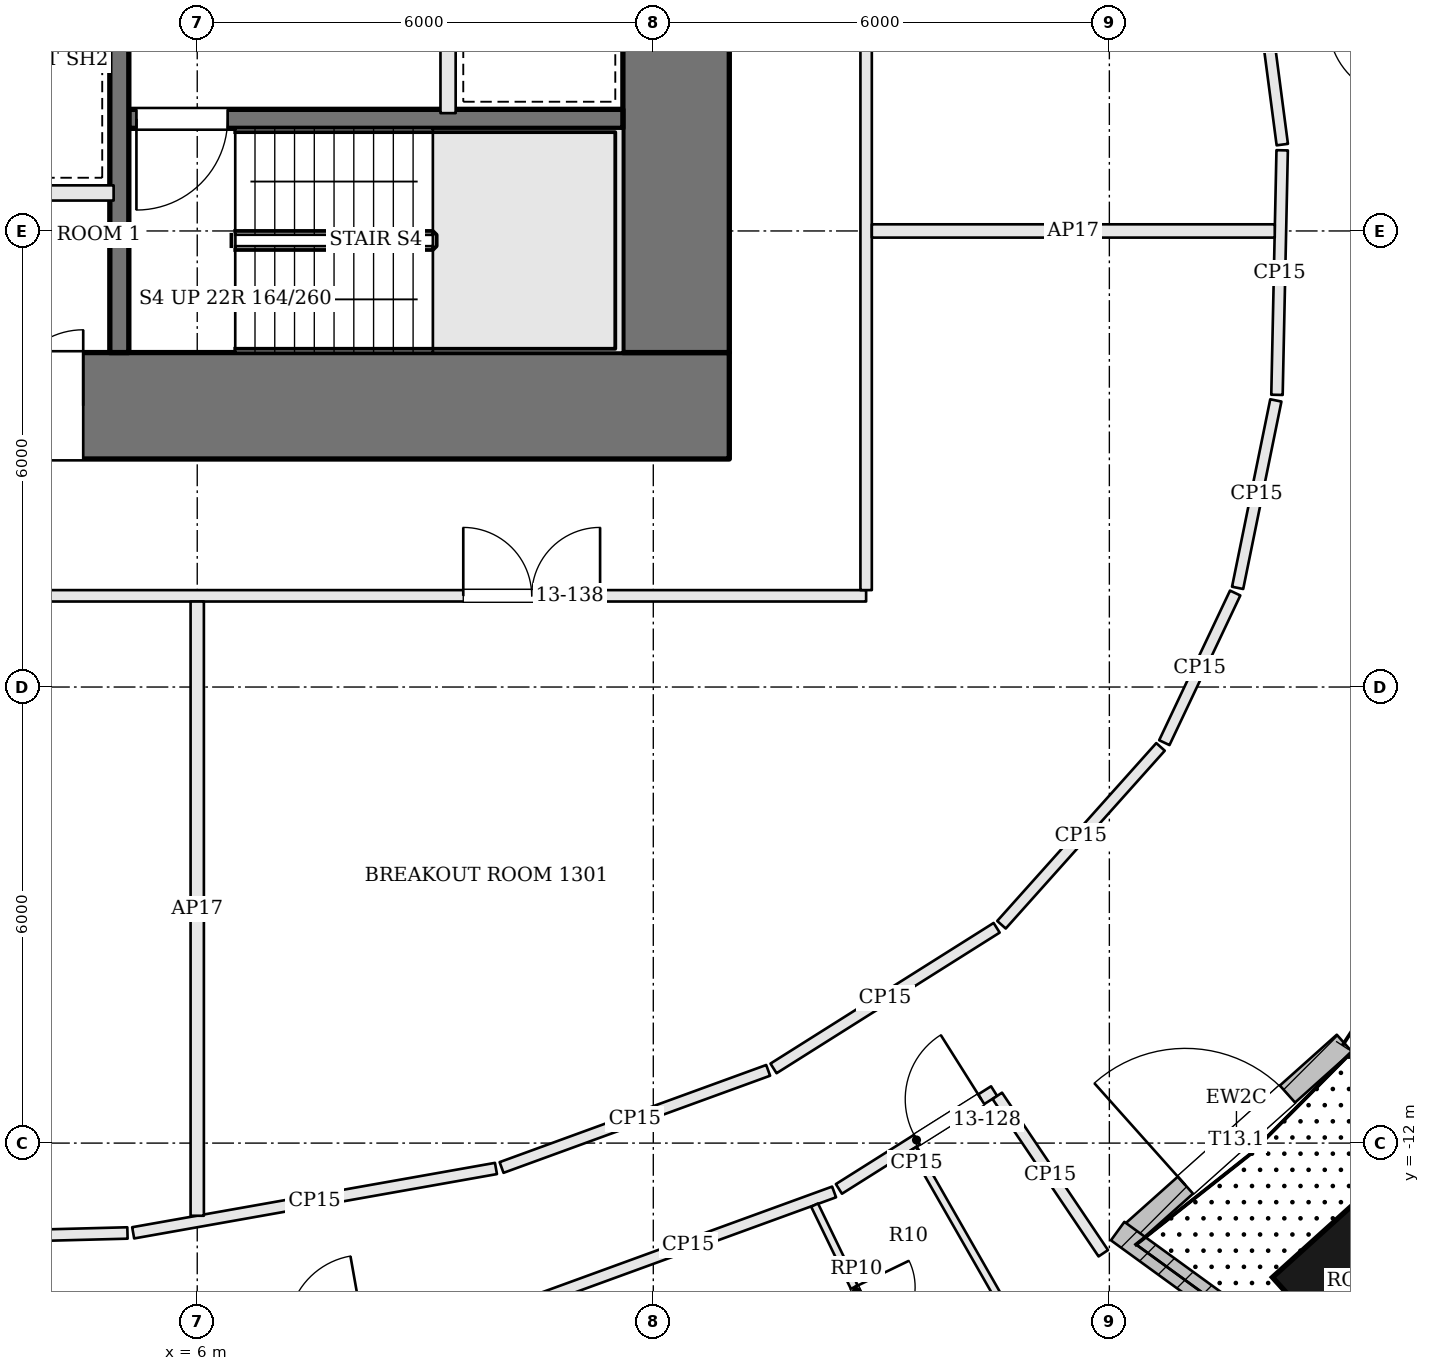
"""IFC4 building model, lengths in metres.
Left out: names, types, materials, properties, quantities, classifications, styles, units other than length and angle.
Written with IfcOpenShell. Run it as: python <this file> out.ifc"""

import sys

from ifc_helpers import new_model, si_unit, direction, frame, frame_2d, origin, origin_2d, place, context, subcontext, project, spatial, rectangle, extrude, element, fill, save


model = new_model("IFC4")
c1 = context("Model", 3, precision=1e-05, world=origin(), true_north=direction((0.0, 1.0)))
c2 = subcontext(c1, "Body", "Model", "MODEL_VIEW")
j1 = project(units=[si_unit("LENGTHUNIT", "METRE"), si_unit("PLANEANGLEUNIT", "RADIAN")], contexts=[c1])
p1 = place(None, origin())
s1 = spatial("IfcSite", under=j1, at=p1, CompositionType="ELEMENT")
p2 = place(p1, origin())
s2 = spatial("IfcBuilding", under=s1, at=p2, CompositionType="ELEMENT")
p3 = place(p2, frame((0.0, 0.0, 62.7)))
s3 = spatial("IfcBuildingStorey", under=s2, at=p3, CompositionType="ELEMENT", Elevation=62.7)
p4 = place(p3, frame((-13.0, -2.3, 0.0), z_axis=(0.0, 0.0, 1.0), x_axis=(1.0, 0.0, 0.0)))
e1 = element("IfcWall", 1, at=p4, inside=s3, PredefinedType="SHEAR", context=c2, shape_type="SweptSolid", body=[
    extrude(rectangle(XDim=26.0, YDim=1.4, at=frame_2d((13.0, 0.0))), origin(), (0.0, 0.0, 1.0), 3.6),
])
p5 = place(p4, frame((9.65, 0.0, 0.0)))
e2 = element("IfcOpeningElement", 2, at=p5, cuts=e1, PredefinedType="OPENING", context=c2, shape_type="SweptSolid", body=[
    extrude(rectangle(XDim=1.0, YDim=2.1, at=frame_2d((0.5, 1.05))), frame((0.0, 0.71, 0.0), z_axis=(0.0, -1.0, 0.0), x_axis=(1.0, 0.0, 0.0)), (0.0, 0.0, 1.0), 1.42),
])
p6 = place(p4, frame((12.925, 0.0, 0.0)))
e3 = element("IfcOpeningElement", 3, at=p6, cuts=e1, PredefinedType="OPENING", context=c2, shape_type="SweptSolid", body=[
    extrude(rectangle(XDim=1.0, YDim=2.1, at=frame_2d((0.5, 1.05))), frame((0.0, 0.71, 0.0), z_axis=(0.0, -1.0, 0.0), x_axis=(1.0, 0.0, 0.0)), (0.0, 0.0, 1.0), 1.42),
])
p7 = place(p4, frame((15.125, 0.0, 0.0)))
e4 = element("IfcOpeningElement", 4, at=p7, cuts=e1, PredefinedType="OPENING", context=c2, shape_type="SweptSolid", body=[
    extrude(rectangle(XDim=0.7, YDim=2.1, at=frame_2d((0.35, 1.05))), frame((0.0, 0.71, 0.0), z_axis=(0.0, -1.0, 0.0), x_axis=(1.0, 0.0, 0.0)), (0.0, 0.0, 1.0), 1.42),
])
p8 = place(p4, frame((16.5, 0.0, 0.0)))
e5 = element("IfcOpeningElement", 5, at=p8, cuts=e1, PredefinedType="OPENING", context=c2, shape_type="SweptSolid", body=[
    extrude(rectangle(XDim=1.0, YDim=2.1, at=frame_2d((0.5, 1.05))), frame((0.0, 0.71, 0.0), z_axis=(0.0, -1.0, 0.0), x_axis=(1.0, 0.0, 0.0)), (0.0, 0.0, 1.0), 1.42),
])
p9 = place(p3, frame((12.3, -1.6, 0.0), z_axis=(0.0, 0.0, 1.0), x_axis=(0.0, 1.0, 0.0)))
e6 = element("IfcWall", 6, at=p9, inside=s3, PredefinedType="SHEAR", context=c2, shape_type="SweptSolid", body=[
    extrude(rectangle(XDim=12.2, YDim=1.4, at=frame_2d((6.1, 0.0))), origin(), (0.0, 0.0, 1.0), 3.6),
])
p10 = place(p9, frame((6.8, 0.0, 0.0)))
e7 = element("IfcOpeningElement", 7, at=p10, cuts=e6, PredefinedType="OPENING", context=c2, shape_type="SweptSolid", body=[
    extrude(rectangle(XDim=1.8, YDim=2.1, at=frame_2d((0.9, 1.05))), frame((0.0, 0.71, 0.0), z_axis=(0.0, -1.0, 0.0), x_axis=(1.0, 0.0, 0.0)), (0.0, 0.0, 1.0), 1.42),
])
p11 = place(p3, frame((21.135, -13.817, 0.0), z_axis=(0.0, 0.0, 1.0), x_axis=(0.742675944539, 0.66965098477, 0.0)))
e8 = element("IfcColumn", 8, at=p11, inside=s3, PredefinedType="COLUMN", context=c2, shape_type="SweptSolid", body=[
    extrude(rectangle(XDim=1.4, YDim=1.4, at=origin_2d()), origin(), (0.0, 0.0, 1.0), 3.6),
])
p12 = place(p3, frame((18.252, -13.222, 0.0), z_axis=(0.0, 0.0, 1.0), x_axis=(0.745864843194, 0.666097316979, 0.0)))
e9 = element("IfcWall", 9, at=p12, inside=s3, PredefinedType="SOLIDWALL", context=c2, shape_type="SweptSolid", body=[
    extrude(rectangle(XDim=3.807, YDim=0.3, at=frame_2d((1.904, 0.0))), origin(), (0.0, 0.0, 1.0), 2.804),
])
p13 = place(p12, frame((1.004, 0.0, 0.0)))
e10 = element("IfcOpeningElement", 10, at=p13, cuts=e9, PredefinedType="OPENING", context=c2, shape_type="SweptSolid", body=[
    extrude(rectangle(XDim=1.8, YDim=2.4, at=frame_2d((0.9, 1.2))), frame((0.0, 0.16, 0.0), z_axis=(0.0, -1.0, 0.0), x_axis=(1.0, 0.0, 0.0)), (0.0, 0.0, 1.0), 0.32),
])
p14 = place(p3, frame((22.5, -16.347, 0.0), z_axis=(0.0, 0.0, 1.0), x_axis=(-0.809084182594, 0.587692764526, 0.0)))
e11 = element("IfcWall", 11, at=p14, inside=s3, PredefinedType="SOLIDWALL", context=c2, shape_type="SweptSolid", body=[
    extrude(rectangle(XDim=5.427, YDim=0.3, at=frame_2d((2.713, 0.0))), origin(), (0.0, 0.0, 1.0), 2.954),
])
p15 = place(p3, frame((11.6, 1.475, 0.0), z_axis=(0.0, 0.0, 1.0), x_axis=(-1.0, 0.0, 0.0)))
e12 = element("IfcWall", 12, at=p15, inside=s3, PredefinedType="SOLIDWALL", context=c2, shape_type="SweptSolid", body=[
    extrude(rectangle(XDim=6.5, YDim=0.25, at=frame_2d((3.25, 0.0))), origin(), (0.0, 0.0, 1.0), 3.4),
])
p16 = place(p15, frame((5.2, 0.0, 0.0)))
e13 = element("IfcOpeningElement", 13, at=p16, cuts=e12, PredefinedType="OPENING", context=c2, shape_type="SweptSolid", body=[
    extrude(rectangle(XDim=1.2, YDim=2.1, at=frame_2d((0.6, 1.05))), frame((0.0, 0.135, 0.0), z_axis=(0.0, -1.0, 0.0), x_axis=(1.0, 0.0, 0.0)), (0.0, 0.0, 1.0), 0.27),
])
p17 = place(p3, frame((9.3, 4.55, 0.0), z_axis=(0.0, 0.0, 1.0), x_axis=(0.0, -1.0, 0.0)))
e14 = element("IfcWall", 14, at=p17, inside=s3, PredefinedType="SOLIDWALL", context=c2, shape_type="SweptSolid", body=[
    extrude(rectangle(XDim=3.0, YDim=0.2, at=frame_2d((1.5, 0.0))), origin(), (0.0, 0.0, 1.0), 3.4),
])
p18 = place(p3, frame((4.975, 10.6, 0.0), z_axis=(0.0, 0.0, 1.0), x_axis=(0.0, -1.0, 0.0)))
e15 = element("IfcWall", 15, at=p18, inside=s3, PredefinedType="SOLIDWALL", context=c2, shape_type="SweptSolid", body=[
    extrude(rectangle(XDim=12.2, YDim=0.25, at=frame_2d((6.1, 0.0))), origin(), (0.0, 0.0, 1.0), 3.4),
])
p19 = place(p18, frame((4.65, 0.0, 0.0)))
e16 = element("IfcOpeningElement", 16, at=p19, cuts=e15, PredefinedType="OPENING", context=c2, shape_type="SweptSolid", body=[
    extrude(rectangle(XDim=1.2, YDim=2.1, at=frame_2d((0.6, 1.05))), frame((0.0, 0.135, 0.0), z_axis=(0.0, -1.0, 0.0), x_axis=(1.0, 0.0, 0.0)), (0.0, 0.0, 1.0), 0.27),
])
p20 = place(p3, frame((-4.9, 0.5, 0.0), z_axis=(0.0, 0.0, 1.0), x_axis=(1.0, 0.0, 0.0)))
e17 = element("IfcWall", 17, at=p20, inside=s3, PredefinedType="SOLIDWALL", context=c2, shape_type="SweptSolid", body=[
    extrude(rectangle(XDim=9.8, YDim=0.2, at=frame_2d((4.9, 0.0))), origin(), (0.0, 0.0, 1.0), 3.4),
])
p21 = place(p3, frame((10.543, -14.04, 0.0), z_axis=(0.0, 0.0, 1.0), x_axis=(0.939576705301, 0.342338450741, 0.0)))
e18 = element("IfcWall", 18, at=p21, inside=s3, PredefinedType="PARTITIONING", context=c2, shape_type="SweptSolid", body=[
    extrude(rectangle(XDim=4.082, YDim=0.15, at=frame_2d((2.041, 0.0))), origin(), (0.0, 0.0, 1.0), 2.68),
])
p22 = place(p3, frame((14.442, -12.603, 0.0), z_axis=(0.0, 0.0, 1.0), x_axis=(0.846002986925, 0.533178156074, 0.0)))
e19 = element("IfcWall", 19, at=p22, inside=s3, PredefinedType="PARTITIONING", context=c2, shape_type="SweptSolid", body=[
    extrude(rectangle(XDim=2.413, YDim=0.15, at=frame_2d((1.207, 0.0))), origin(), (0.0, 0.0, 1.0), 2.68),
])
p23 = place(p22, frame((1.213, 0.0, 0.0)))
e20 = element("IfcOpeningElement", 20, at=p23, cuts=e19, PredefinedType="OPENING", context=c2, shape_type="SweptSolid", body=[
    extrude(rectangle(XDim=1.0, YDim=2.1, at=frame_2d((0.5, 1.05))), frame((0.0, 0.085, 0.0), z_axis=(0.0, -1.0, 0.0), x_axis=(1.0, 0.0, 0.0)), (0.0, 0.0, 1.0), 0.17),
])
p24 = place(p3, frame((17.92, -13.449, 0.0), z_axis=(0.0, 0.0, 1.0), x_axis=(-0.558575665577, 0.829453570627, 0.0)))
e21 = element("IfcWall", 21, at=p24, inside=s3, PredefinedType="PARTITIONING", context=c2, shape_type="SweptSolid", body=[
    extrude(rectangle(XDim=2.497, YDim=0.15, at=frame_2d((1.248, 0.0))), origin(), (0.0, 0.0, 1.0), 2.68),
])
p25 = place(p3, frame((19.915, 3.882, 0.0), z_axis=(0.0, 0.0, 1.0), x_axis=(0.129945947446, -0.991521079323, 0.0)))
e22 = element("IfcWall", 22, at=p25, inside=s3, PredefinedType="PARTITIONING", context=c2, shape_type="SweptSolid", body=[
    extrude(rectangle(XDim=2.769, YDim=0.15, at=frame_2d((1.385, 0.0))), origin(), (0.0, 0.0, 1.0), 2.68),
])
p26 = place(p3, frame((20.273, 1.061, 0.0), z_axis=(0.0, 0.0, 1.0), x_axis=(-0.021166906337, -0.99977595594, 0.0)))
e23 = element("IfcWall", 23, at=p26, inside=s3, PredefinedType="PARTITIONING", context=c2, shape_type="SweptSolid", body=[
    extrude(rectangle(XDim=3.218, YDim=0.15, at=frame_2d((1.609, 0.0))), origin(), (0.0, 0.0, 1.0), 2.68),
])
p27 = place(p3, frame((20.19, -2.229, 0.0), z_axis=(0.0, 0.0, 1.0), x_axis=(-0.199752828647, -0.97984631828, 0.0)))
e24 = element("IfcWall", 24, at=p27, inside=s3, PredefinedType="PARTITIONING", context=c2, shape_type="SweptSolid", body=[
    extrude(rectangle(XDim=2.517, YDim=0.15, at=frame_2d((1.258, 0.0))), origin(), (0.0, 0.0, 1.0), 2.68),
])
p28 = place(p3, frame((19.655, -4.763, 0.0), z_axis=(0.0, 0.0, 1.0), x_axis=(-0.427965880464, -0.903794891089, 0.0)))
e25 = element("IfcWall", 25, at=p28, inside=s3, PredefinedType="PARTITIONING", context=c2, shape_type="SweptSolid", body=[
    extrude(rectangle(XDim=2.178, YDim=0.15, at=frame_2d((1.089, 0.0))), origin(), (0.0, 0.0, 1.0), 2.68),
])
p29 = place(p3, frame((18.673, -6.788, 0.0), z_axis=(0.0, 0.0, 1.0), x_axis=(-0.666610670036, -0.745406073623, 0.0)))
e26 = element("IfcWall", 26, at=p29, inside=s3, PredefinedType="PARTITIONING", context=c2, shape_type="SweptSolid", body=[
    extrude(rectangle(XDim=3.139, YDim=0.15, at=frame_2d((1.569, 0.0))), origin(), (0.0, 0.0, 1.0), 2.68),
])
p30 = place(p3, frame((16.517, -9.167, 0.0), z_axis=(0.0, 0.0, 1.0), x_axis=(-0.846000117603, -0.533182708849, 0.0)))
e27 = element("IfcWall", 27, at=p30, inside=s3, PredefinedType="PARTITIONING", context=c2, shape_type="SweptSolid", body=[
    extrude(rectangle(XDim=3.47, YDim=0.15, at=frame_2d((1.735, 0.0))), origin(), (0.0, 0.0, 1.0), 2.68),
])
p31 = place(p3, frame((13.511, -11.043, 0.0), z_axis=(0.0, 0.0, 1.0), x_axis=(-0.939583191704, -0.342320647736, 0.0)))
e28 = element("IfcWall", 28, at=p31, inside=s3, PredefinedType="PARTITIONING", context=c2, shape_type="SweptSolid", body=[
    extrude(rectangle(XDim=3.733, YDim=0.15, at=frame_2d((1.866, 0.0))), origin(), (0.0, 0.0, 1.0), 2.68),
])
p32 = place(p3, frame((9.93, -12.334, 0.0), z_axis=(0.0, 0.0, 1.0), x_axis=(-0.984638212434, -0.174606960386, 0.0)))
e29 = element("IfcWall", 29, at=p32, inside=s3, PredefinedType="PARTITIONING", context=c2, shape_type="SweptSolid", body=[
    extrude(rectangle(XDim=4.848, YDim=0.15, at=frame_2d((2.424, 0.0))), origin(), (0.0, 0.0, 1.0), 2.68),
])
p33 = place(p3, frame((5.082, -13.182, 0.0), z_axis=(0.0, 0.0, 1.0), x_axis=(-0.999661624383, -0.026012242045, 0.0)))
e30 = element("IfcWall", 30, at=p33, inside=s3, PredefinedType="PARTITIONING", context=c2, shape_type="SweptSolid", body=[
    extrude(rectangle(XDim=7.218, YDim=0.15, at=frame_2d((3.609, 0.0))), origin(), (0.0, 0.0, 1.0), 2.68),
])
p34 = place(p3, frame((-14.725, -4.8, 0.0), z_axis=(0.0, 0.0, 1.0), x_axis=(1.0, 0.0, 0.0)))
e31 = element("IfcWall", 31, at=p34, inside=s3, PredefinedType="PARTITIONING", context=c2, shape_type="SweptSolid", body=[
    extrude(rectangle(XDim=29.525, YDim=0.15, at=frame_2d((14.763, 0.0))), origin(), (0.0, 0.0, 1.0), 2.68),
])
p35 = place(p34, frame((3.425, 0.0, 0.0)))
e32 = element("IfcOpeningElement", 32, at=p35, cuts=e31, PredefinedType="OPENING", context=c2, shape_type="SweptSolid", body=[
    extrude(rectangle(XDim=1.8, YDim=2.1, at=frame_2d((0.9, 1.05))), frame((0.0, 0.085, 0.0), z_axis=(0.0, -1.0, 0.0), x_axis=(1.0, 0.0, 0.0)), (0.0, 0.0, 1.0), 0.17),
])
p36 = place(p34, frame((13.825, 0.0, 0.0)))
e33 = element("IfcOpeningElement", 33, at=p36, cuts=e31, PredefinedType="OPENING", context=c2, shape_type="SweptSolid", body=[
    extrude(rectangle(XDim=1.8, YDim=2.1, at=frame_2d((0.9, 1.05))), frame((0.0, 0.085, 0.0), z_axis=(0.0, -1.0, 0.0), x_axis=(1.0, 0.0, 0.0)), (0.0, 0.0, 1.0), 0.17),
])
p37 = place(p34, frame((24.225, 0.0, 0.0)))
e34 = element("IfcOpeningElement", 34, at=p37, cuts=e31, PredefinedType="OPENING", context=c2, shape_type="SweptSolid", body=[
    extrude(rectangle(XDim=1.8, YDim=2.1, at=frame_2d((0.9, 1.05))), frame((0.0, 0.085, 0.0), z_axis=(0.0, -1.0, 0.0), x_axis=(1.0, 0.0, 0.0)), (0.0, 0.0, 1.0), 0.17),
])
p38 = place(p3, frame((14.8, -4.725, 0.0), z_axis=(0.0, 0.0, 1.0), x_axis=(0.0, 1.0, 0.0)))
e35 = element("IfcWall", 35, at=p38, inside=s3, PredefinedType="PARTITIONING", context=c2, shape_type="SweptSolid", body=[
    extrude(rectangle(XDim=15.008, YDim=0.15, at=frame_2d((7.504, 0.0))), origin(), (0.0, 0.0, 1.0), 2.68),
])
p39 = place(p38, frame((9.366, 0.0, 0.0)))
e36 = element("IfcOpeningElement", 36, at=p39, cuts=e35, PredefinedType="OPENING", context=c2, shape_type="SweptSolid", body=[
    extrude(rectangle(XDim=1.0, YDim=2.1, at=frame_2d((0.5, 1.05))), frame((0.0, 0.085, 0.0), z_axis=(0.0, -1.0, 0.0), x_axis=(1.0, 0.0, 0.0)), (0.0, 0.0, 1.0), 0.17),
])
p40 = place(p3, frame((19.877, -19.859, 0.0), z_axis=(0.0, 0.0, 1.0), x_axis=(-0.496434961101, 0.868073919316, 0.0)))
e37 = element("IfcWall", 37, at=p40, inside=s3, PredefinedType="PARTITIONING", context=c2, shape_type="SweptSolid", body=[
    extrude(rectangle(XDim=8.97, YDim=0.1, at=frame_2d((4.485, 0.0))), origin(), (0.0, 0.0, 1.0), 2.68),
])
p41 = place(p40, frame((4.895, 0.0, 0.0)))
e38 = element("IfcOpeningElement", 38, at=p41, cuts=e37, PredefinedType="OPENING", context=c2, shape_type="SweptSolid", body=[
    extrude(rectangle(XDim=0.9, YDim=2.4, at=frame_2d((0.45, 1.2))), frame((0.0, 0.06, 0.0), z_axis=(0.0, -1.0, 0.0), x_axis=(1.0, 0.0, 0.0)), (0.0, 0.0, 1.0), 0.12),
])
p42 = place(p3, frame((14.122, -12.816, 0.0), z_axis=(0.0, 0.0, 1.0), x_axis=(0.435611476295, -0.900134790862, 0.0)))
e39 = element("IfcWall", 39, at=p42, inside=s3, PredefinedType="PARTITIONING", context=c2, shape_type="SweptSolid", body=[
    extrude(rectangle(XDim=2.525, YDim=0.1, at=frame_2d((1.262, 0.0))), origin(), (0.0, 0.0, 1.0), 2.68),
])
p43 = place(p42, frame((1.2, 0.0, 0.0)))
e40 = element("IfcOpeningElement", 40, at=p43, cuts=e39, PredefinedType="OPENING", context=c2, shape_type="SweptSolid", body=[
    extrude(rectangle(XDim=0.8, YDim=2.1, at=frame_2d((0.4, 1.05))), frame((0.0, 0.06, 0.0), z_axis=(0.0, -1.0, 0.0), x_axis=(1.0, 0.0, 0.0)), (0.0, 0.0, 1.0), 0.12),
])
p44 = place(p3, frame((6.0, -12.956, 0.0), z_axis=(0.0, 0.0, 1.0), x_axis=(0.0, 1.0, 0.0)))
e41 = element("IfcWall", 41, at=p44, inside=s3, PredefinedType="PARTITIONING", context=c2, shape_type="SweptSolid", body=[
    extrude(rectangle(XDim=8.081, YDim=0.175, at=frame_2d((4.041, 0.0))), origin(), (0.0, 0.0, 1.0), 2.68),
])
p45 = place(p3, frame((14.875, 0.0, 0.0), z_axis=(0.0, 0.0, 1.0), x_axis=(1.0, 0.0, 0.0)))
e42 = element("IfcWall", 42, at=p45, inside=s3, PredefinedType="PARTITIONING", context=c2, shape_type="SweptSolid", body=[
    extrude(rectangle(XDim=5.301, YDim=0.175, at=frame_2d((2.65, 0.0))), origin(), (0.0, 0.0, 1.0), 2.68),
])
p46 = place(p13, origin())
e43 = element("IfcDoor", 43, at=p46, inside=s3, OperationType="DOUBLE_DOOR_DOUBLE_SWING", PredefinedType="DOOR", context=c2, shape_type="SweptSolid", body=[
    extrude(rectangle(XDim=1.8, YDim=2.4, at=frame_2d((0.9, 1.2))), frame((0.0, 0.025, 0.0), z_axis=(0.0, -1.0, 0.0), x_axis=(1.0, 0.0, 0.0)), (0.0, 0.0, 1.0), 0.05),
])
fill(e10, e43)
p47 = place(p16, origin())
e44 = element("IfcDoor", 44, at=p47, inside=s3, OperationType="SINGLE_SWING_RIGHT", PredefinedType="DOOR", context=c2, shape_type="SweptSolid", body=[
    extrude(rectangle(XDim=1.2, YDim=2.1, at=frame_2d((0.6, 1.05))), frame((0.0, 0.025, 0.0), z_axis=(0.0, -1.0, 0.0), x_axis=(1.0, 0.0, 0.0)), (0.0, 0.0, 1.0), 0.05),
])
fill(e13, e44)
p48 = place(p8, origin())
e45 = element("IfcDoor", 45, at=p48, inside=s3, OperationType="SINGLE_SWING_RIGHT", PredefinedType="DOOR", context=c2, shape_type="SweptSolid", body=[
    extrude(rectangle(XDim=1.0, YDim=2.1, at=frame_2d((0.5, 1.05))), frame((0.0, 0.025, 0.0), z_axis=(0.0, -1.0, 0.0), x_axis=(1.0, 0.0, 0.0)), (0.0, 0.0, 1.0), 0.05),
])
fill(e5, e45)
p49 = place(p43, origin())
e46 = element("IfcDoor", 46, at=p49, inside=s3, OperationType="SINGLE_SWING_LEFT", PredefinedType="DOOR", context=c2, shape_type="SweptSolid", body=[
    extrude(rectangle(XDim=0.8, YDim=2.1, at=frame_2d((0.4, 1.05))), frame((0.0, 0.025, 0.0), z_axis=(0.0, -1.0, 0.0), x_axis=(1.0, 0.0, 0.0)), (0.0, 0.0, 1.0), 0.05),
])
fill(e40, e46)
p50 = place(p23, origin())
e47 = element("IfcDoor", 47, at=p50, inside=s3, OperationType="SINGLE_SWING_RIGHT", PredefinedType="DOOR", context=c2, shape_type="SweptSolid", body=[
    extrude(rectangle(XDim=1.0, YDim=2.1, at=frame_2d((0.5, 1.05))), frame((0.0, 0.025, 0.0), z_axis=(0.0, -1.0, 0.0), x_axis=(1.0, 0.0, 0.0)), (0.0, 0.0, 1.0), 0.05),
])
fill(e20, e47)
p51 = place(p37, origin())
e48 = element("IfcDoor", 48, at=p51, inside=s3, OperationType="DOUBLE_DOOR_SINGLE_SWING", PredefinedType="DOOR", context=c2, shape_type="SweptSolid", body=[
    extrude(rectangle(XDim=1.8, YDim=2.1, at=frame_2d((0.9, 1.05))), frame((0.0, 0.025, 0.0), z_axis=(0.0, -1.0, 0.0), x_axis=(1.0, 0.0, 0.0)), (0.0, 0.0, 1.0), 0.05),
])
fill(e34, e48)
save(model, sys.argv[1])
